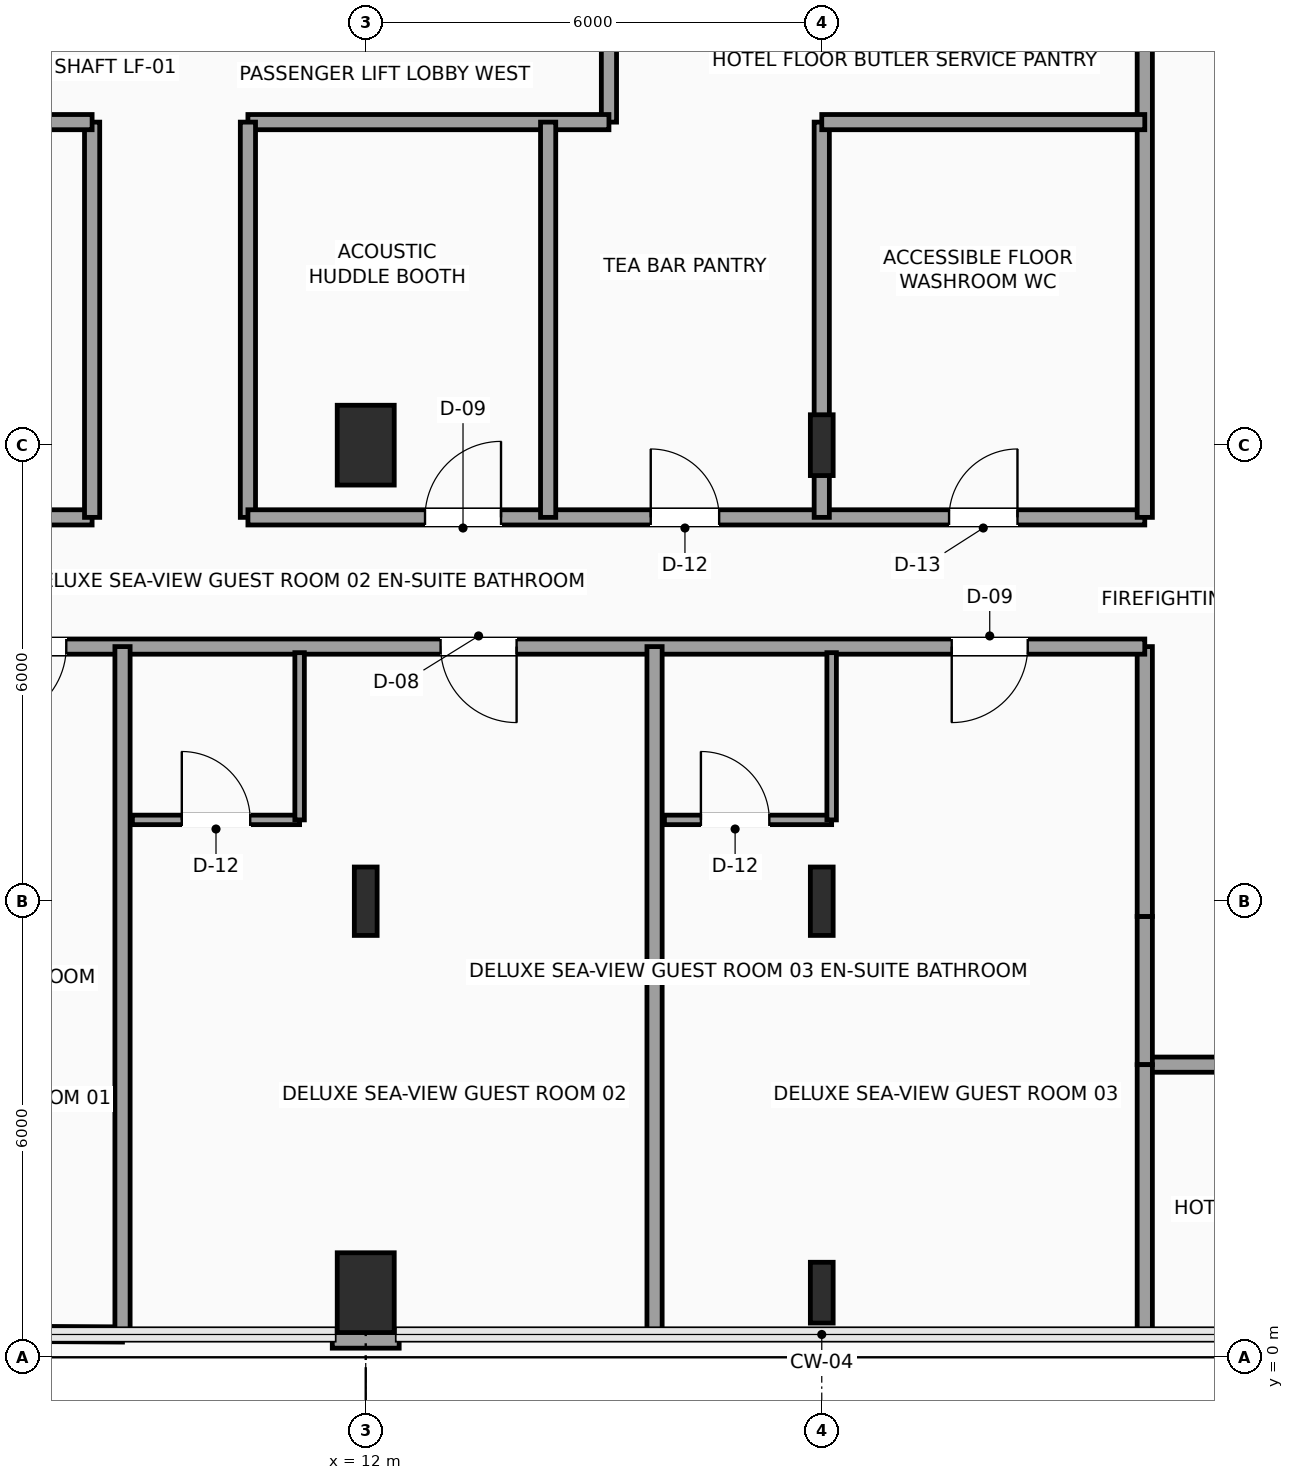
"""IFC4 building model, lengths in metres.
Left out: names, types, materials, properties, quantities, classifications, styles, units other than length and angle.
Written with IfcOpenShell. Run it as: python <this file> out.ifc"""

import sys

from ifc_helpers import new_model, si_unit, direction, frame, frame_2d, origin, origin_2d, place, context, subcontext, project, spatial, rectangle, i_section, extrude, element, fill, save


model = new_model("IFC4")
c1 = context("Model", 3, precision=1e-05, world=origin(), true_north=direction((0.0, 1.0)))
c2 = subcontext(c1, "Body", "Model", "MODEL_VIEW")
j1 = project(units=[si_unit("LENGTHUNIT", "METRE"), si_unit("PLANEANGLEUNIT", "RADIAN")], contexts=[c1])
p1 = place(None, origin())
s1 = spatial("IfcSite", under=j1, at=p1, CompositionType="ELEMENT")
p2 = place(p1, origin())
s2 = spatial("IfcBuilding", under=s1, at=p2, CompositionType="ELEMENT")
p3 = place(p2, frame((0.0, 0.0, 169.2)))
s3 = spatial("IfcBuildingStorey", under=s2, at=p3, CompositionType="ELEMENT", Elevation=169.2)
p4 = place(p3, frame((12.0, 0.85, 0.0), z_axis=(0.0, 0.0, 1.0), x_axis=(1.0, 0.0, 0.0)))
e1 = element("IfcColumn", 1, at=p4, inside=s3, PredefinedType="COLUMN", context=c2, shape_type="SweptSolid", body=[
    extrude(rectangle(XDim=0.75, YDim=1.05, at=origin_2d()), origin(), (0.0, 0.0, 1.0), 3.75),
])
p5 = place(p3, frame((12.0, 6.0, 0.0), z_axis=(0.0, 0.0, 1.0), x_axis=(1.0, 0.0, 0.0)))
e2 = element("IfcColumn", 2, at=p5, inside=s3, PredefinedType="COLUMN", context=c2, shape_type="SweptSolid", body=[
    extrude(i_section(OverallWidth=0.3, OverallDepth=0.9, WebThickness=0.019, FlangeThickness=0.035, FilletRadius=0.03, at=origin_2d()), origin(), (0.0, 0.0, 1.0), 3.75),
])
p6 = place(p3, frame((12.0, 12.0, 0.0), z_axis=(0.0, 0.0, 1.0), x_axis=(1.0, 0.0, 0.0)))
e3 = element("IfcColumn", 3, at=p6, inside=s3, PredefinedType="COLUMN", context=c2, shape_type="SweptSolid", body=[
    extrude(rectangle(XDim=0.75, YDim=1.05, at=origin_2d()), origin(), (0.0, 0.0, 1.0), 3.75),
])
p7 = place(p3, frame((18.0, 0.85, 0.0), z_axis=(0.0, 0.0, 1.0), x_axis=(1.0, 0.0, 0.0)))
e4 = element("IfcColumn", 4, at=p7, inside=s3, PredefinedType="COLUMN", context=c2, shape_type="SweptSolid", body=[
    extrude(i_section(OverallWidth=0.3, OverallDepth=0.8, WebThickness=0.018, FlangeThickness=0.033, FilletRadius=0.03, at=origin_2d()), origin(), (0.0, 0.0, 1.0), 3.75),
])
p8 = place(p3, frame((18.0, 6.0, 0.0), z_axis=(0.0, 0.0, 1.0), x_axis=(1.0, 0.0, 0.0)))
e5 = element("IfcColumn", 5, at=p8, inside=s3, PredefinedType="COLUMN", context=c2, shape_type="SweptSolid", body=[
    extrude(i_section(OverallWidth=0.3, OverallDepth=0.9, WebThickness=0.019, FlangeThickness=0.035, FilletRadius=0.03, at=origin_2d()), origin(), (0.0, 0.0, 1.0), 3.75),
])
p9 = place(p3, frame((18.0, 12.0, 0.0), z_axis=(0.0, 0.0, 1.0), x_axis=(1.0, 0.0, 0.0)))
e6 = element("IfcColumn", 6, at=p9, inside=s3, PredefinedType="COLUMN", context=c2, shape_type="SweptSolid", body=[
    extrude(i_section(OverallWidth=0.3, OverallDepth=0.8, WebThickness=0.018, FlangeThickness=0.033, FilletRadius=0.03, at=origin_2d()), origin(), (0.0, 0.0, 1.0), 3.75),
])
p10 = place(p3, frame((12.44, 0.24, 0.0), z_axis=(0.0, 0.0, 1.0), x_axis=(-1.0, 0.0, 0.0)))
e7 = element("IfcWall", 7, at=p10, inside=s3, PredefinedType="SOLIDWALL", context=c2, shape_type="SweptSolid", body=[
    extrude(rectangle(XDim=0.88, YDim=0.24, at=frame_2d((0.44, 0.0))), origin(), (0.0, 0.0, 1.0), 3.54),
])
p11 = place(p3, frame((23.95, 3.85, 0.0), z_axis=(0.0, 0.0, 1.0), x_axis=(-1.0, 0.0, 0.0)))
e8 = element("IfcWall", 8, at=p11, inside=s3, PredefinedType="PARTITIONING", context=c2, shape_type="SweptSolid", body=[
    extrude(rectangle(XDim=1.7, YDim=0.2, at=frame_2d((0.85, 0.0))), origin(), (0.0, 0.0, 1.0), 3.54),
])
p12 = place(p3, frame((22.25, 3.85, 0.0), z_axis=(0.0, 0.0, 1.0), x_axis=(0.0, 1.0, 0.0)))
e9 = element("IfcWall", 9, at=p12, inside=s3, PredefinedType="PARTITIONING", context=c2, shape_type="SweptSolid", body=[
    extrude(rectangle(XDim=1.95, YDim=0.2, at=frame_2d((0.975, 0.0))), origin(), (0.0, 0.0, 1.0), 3.54),
])
p13 = place(p3, frame((22.25, 5.8, 0.0), z_axis=(0.0, 0.0, 1.0), x_axis=(0.0, 1.0, 0.0)))
e10 = element("IfcWall", 10, at=p13, inside=s3, PredefinedType="PARTITIONING", context=c2, shape_type="SweptSolid", body=[
    extrude(rectangle(XDim=3.55, YDim=0.2, at=frame_2d((1.775, 0.0))), origin(), (0.0, 0.0, 1.0), 3.54),
])
p14 = place(p3, frame((22.25, 9.35, 0.0), z_axis=(0.0, 0.0, 1.0), x_axis=(-1.0, 0.0, 0.0)))
e11 = element("IfcWall", 11, at=p14, inside=s3, PredefinedType="PARTITIONING", context=c2, shape_type="SweptSolid", body=[
    extrude(rectangle(XDim=15.85, YDim=0.2, at=frame_2d((7.925, 0.0))), origin(), (0.0, 0.0, 1.0), 3.54),
])
p15 = place(p14, frame((14.19, 0.0, 0.0)))
e12 = element("IfcOpeningElement", 12, at=p15, cuts=e11, PredefinedType="OPENING", context=c2, shape_type="SweptSolid", body=[
    extrude(rectangle(XDim=1.0, YDim=2.2, at=frame_2d((0.5, 1.1))), frame((0.0, 0.11, 0.0), z_axis=(0.0, -1.0, 0.0), x_axis=(1.0, 0.0, 0.0)), (0.0, 0.0, 1.0), 0.22),
])
p16 = place(p14, frame((8.265, 0.0, 0.0)))
e13 = element("IfcOpeningElement", 13, at=p16, cuts=e11, PredefinedType="OPENING", context=c2, shape_type="SweptSolid", body=[
    extrude(rectangle(XDim=1.0, YDim=2.2, at=frame_2d((0.5, 1.1))), frame((0.0, 0.11, 0.0), z_axis=(0.0, -1.0, 0.0), x_axis=(1.0, 0.0, 0.0)), (0.0, 0.0, 1.0), 0.22),
])
p17 = place(p14, frame((1.54, 0.0, 0.0)))
e14 = element("IfcOpeningElement", 14, at=p17, cuts=e11, PredefinedType="OPENING", context=c2, shape_type="SweptSolid", body=[
    extrude(rectangle(XDim=1.0, YDim=2.2, at=frame_2d((0.5, 1.1))), frame((0.0, 0.11, 0.0), z_axis=(0.0, -1.0, 0.0), x_axis=(1.0, 0.0, 0.0)), (0.0, 0.0, 1.0), 0.22),
])
p18 = place(p3, frame((6.4, 11.05, 0.0), z_axis=(0.0, 0.0, 1.0), x_axis=(1.0, 0.0, 0.0)))
e15 = element("IfcWall", 15, at=p18, inside=s3, PredefinedType="PARTITIONING", context=c2, shape_type="SweptSolid", body=[
    extrude(rectangle(XDim=2.0, YDim=0.2, at=frame_2d((1.0, 0.0))), origin(), (0.0, 0.0, 1.0), 3.54),
])
p19 = place(p3, frame((8.4, 11.05, 0.0), z_axis=(0.0, 0.0, 1.0), x_axis=(0.0, 1.0, 0.0)))
e16 = element("IfcWall", 16, at=p19, inside=s3, PredefinedType="PARTITIONING", context=c2, shape_type="SweptSolid", body=[
    extrude(rectangle(XDim=5.2, YDim=0.2, at=frame_2d((2.6, 0.0))), origin(), (0.0, 0.0, 1.0), 3.54),
])
p20 = place(p3, frame((8.4, 16.25, 0.0), z_axis=(0.0, 0.0, 1.0), x_axis=(-1.0, 0.0, 0.0)))
e17 = element("IfcWall", 17, at=p20, inside=s3, PredefinedType="PARTITIONING", context=c2, shape_type="SweptSolid", body=[
    extrude(rectangle(XDim=8.1, YDim=0.2, at=frame_2d((4.05, 0.0))), origin(), (0.0, 0.0, 1.0), 3.54),
])
p21 = place(p20, frame((3.525, 0.0, 0.0)))
e18 = element("IfcOpeningElement", 18, at=p21, cuts=e17, PredefinedType="OPENING", context=c2, shape_type="SweptSolid", body=[
    extrude(rectangle(XDim=1.0, YDim=2.2, at=frame_2d((0.5, 1.1))), frame((0.0, 0.11, 0.0), z_axis=(0.0, -1.0, 0.0), x_axis=(1.0, 0.0, 0.0)), (0.0, 0.0, 1.0), 0.22),
])
p22 = place(p3, frame((15.2, 17.95, 0.0), z_axis=(0.0, 0.0, 1.0), x_axis=(0.0, -1.0, 0.0)))
e19 = element("IfcWall", 19, at=p22, inside=s3, PredefinedType="PARTITIONING", context=c2, shape_type="SweptSolid", body=[
    extrude(rectangle(XDim=1.7, YDim=0.2, at=frame_2d((0.85, 0.0))), origin(), (0.0, 0.0, 1.0), 3.54),
])
p23 = place(p3, frame((15.2, 16.25, 0.0), z_axis=(0.0, 0.0, 1.0), x_axis=(-1.0, 0.0, 0.0)))
e20 = element("IfcWall", 20, at=p23, inside=s3, PredefinedType="PARTITIONING", context=c2, shape_type="SweptSolid", body=[
    extrude(rectangle(XDim=4.75, YDim=0.2, at=frame_2d((2.375, 0.0))), origin(), (0.0, 0.0, 1.0), 3.54),
])
p24 = place(p3, frame((10.45, 16.25, 0.0), z_axis=(0.0, 0.0, 1.0), x_axis=(0.0, -1.0, 0.0)))
e21 = element("IfcWall", 21, at=p24, inside=s3, PredefinedType="PARTITIONING", context=c2, shape_type="SweptSolid", body=[
    extrude(rectangle(XDim=5.2, YDim=0.2, at=frame_2d((2.6, 0.0))), origin(), (0.0, 0.0, 1.0), 3.54),
])
p25 = place(p3, frame((10.45, 11.05, 0.0), z_axis=(0.0, 0.0, 1.0), x_axis=(1.0, 0.0, 0.0)))
e22 = element("IfcWall", 22, at=p25, inside=s3, PredefinedType="PARTITIONING", context=c2, shape_type="SweptSolid", body=[
    extrude(rectangle(XDim=11.8, YDim=0.2, at=frame_2d((5.9, 0.0))), origin(), (0.0, 0.0, 1.0), 3.54),
])
p26 = place(p25, frame((2.33, 0.0, 0.0)))
e23 = element("IfcOpeningElement", 23, at=p26, cuts=e22, PredefinedType="OPENING", context=c2, shape_type="SweptSolid", body=[
    extrude(rectangle(XDim=1.0, YDim=2.2, at=frame_2d((0.5, 1.1))), frame((0.0, 0.11, 0.0), z_axis=(0.0, -1.0, 0.0), x_axis=(1.0, 0.0, 0.0)), (0.0, 0.0, 1.0), 0.22),
])
p27 = place(p25, frame((5.3, 0.0, 0.0)))
e24 = element("IfcOpeningElement", 24, at=p27, cuts=e22, PredefinedType="OPENING", context=c2, shape_type="SweptSolid", body=[
    extrude(rectangle(XDim=0.9, YDim=2.1, at=frame_2d((0.45, 1.05))), frame((0.0, 0.11, 0.0), z_axis=(0.0, -1.0, 0.0), x_axis=(1.0, 0.0, 0.0)), (0.0, 0.0, 1.0), 0.22),
])
p28 = place(p25, frame((9.225, 0.0, 0.0)))
e25 = element("IfcOpeningElement", 25, at=p28, cuts=e22, PredefinedType="OPENING", context=c2, shape_type="SweptSolid", body=[
    extrude(rectangle(XDim=0.9, YDim=2.1, at=frame_2d((0.45, 1.05))), frame((0.0, 0.11, 0.0), z_axis=(0.0, -1.0, 0.0), x_axis=(1.0, 0.0, 0.0)), (0.0, 0.0, 1.0), 0.22),
])
p29 = place(p3, frame((22.25, 11.05, 0.0), z_axis=(0.0, 0.0, 1.0), x_axis=(0.0, 1.0, 0.0)))
e26 = element("IfcWall", 26, at=p29, inside=s3, PredefinedType="PARTITIONING", context=c2, shape_type="SweptSolid", body=[
    extrude(rectangle(XDim=19.2, YDim=0.2, at=frame_2d((9.6, 0.0))), origin(), (0.0, 0.0, 1.0), 3.54),
])
p30 = place(p3, frame((14.4, 11.05, 0.0), z_axis=(0.0, 0.0, 1.0), x_axis=(0.0, 1.0, 0.0)))
e27 = element("IfcWall", 27, at=p30, inside=s3, PredefinedType="PARTITIONING", context=c2, shape_type="SweptSolid", body=[
    extrude(rectangle(XDim=5.2, YDim=0.2, at=frame_2d((2.6, 0.0))), origin(), (0.0, 0.0, 1.0), 3.54),
])
p31 = place(p3, frame((18.0, 11.05, 0.0), z_axis=(0.0, 0.0, 1.0), x_axis=(0.0, 1.0, 0.0)))
e28 = element("IfcWall", 28, at=p31, inside=s3, PredefinedType="PARTITIONING", context=c2, shape_type="SweptSolid", body=[
    extrude(rectangle(XDim=5.2, YDim=0.2, at=frame_2d((2.6, 0.0))), origin(), (0.0, 0.0, 1.0), 3.132),
])
p32 = place(p3, frame((18.0, 16.25, 0.0), z_axis=(0.0, 0.0, 1.0), x_axis=(1.0, 0.0, 0.0)))
e29 = element("IfcWall", 29, at=p32, inside=s3, PredefinedType="PARTITIONING", context=c2, shape_type="SweptSolid", body=[
    extrude(rectangle(XDim=4.25, YDim=0.2, at=frame_2d((2.125, 0.0))), origin(), (0.0, 0.0, 1.0), 3.54),
])
p33 = place(p3, frame((22.25, 0.3, 0.0), z_axis=(0.0, 0.0, 1.0), x_axis=(0.0, 1.0, 0.0)))
e30 = element("IfcWall", 30, at=p33, inside=s3, PredefinedType="PARTITIONING", context=c2, shape_type="SweptSolid", body=[
    extrude(rectangle(XDim=3.55, YDim=0.2, at=frame_2d((1.775, 0.0))), origin(), (0.0, 0.0, 1.0), 3.54),
])
p34 = place(p3, frame((0.35, 0.35, 0.0), z_axis=(0.0, 0.0, 1.0), x_axis=(0.99998245966, -0.005922868574, 0.0)))
e31 = element("IfcWall", 31, at=p34, inside=s3, PredefinedType="PARTITIONING", context=c2, shape_type="SweptSolid", body=[
    extrude(rectangle(XDim=8.45, YDim=0.2, at=frame_2d((4.225, 0.0))), origin(), (0.0, 0.0, 1.0), 3.54),
])
for number, where, z_axis, x_axis in (
    (32, (8.8, 0.3, 0.0), (0.0, 0.0, 1.0), (0.0, 1.0, 0.0)),
    (33, (15.8, 0.3, 0.0), (0.0, 0.0, 1.0), (0.0, 1.0, 0.0)),
):
    element("IfcWall", number, at=place(p3, frame(where, z_axis=z_axis, x_axis=x_axis)), inside=s3, PredefinedType="PARTITIONING", context=c2, shape_type="SweptSolid", body=[
        extrude(rectangle(XDim=9.05, YDim=0.2, at=frame_2d((4.525, 0.0))), origin(), (0.0, 0.0, 1.0), 3.54),
    ])
p35 = place(p3, frame((8.93, 7.07, 0.0), z_axis=(0.0, 0.0, 1.0), x_axis=(1.0, 0.0, 0.0)))
e34 = element("IfcWall", 34, at=p35, inside=s3, PredefinedType="PARTITIONING", context=c2, shape_type="SweptSolid", body=[
    extrude(rectangle(XDim=2.2, YDim=0.125, at=frame_2d((1.1, 0.0))), origin(), (0.0, 0.0, 1.0), 3.54),
])
p36 = place(p35, frame((0.65, 0.0, 0.0)))
e35 = element("IfcOpeningElement", 35, at=p36, cuts=e34, PredefinedType="OPENING", context=c2, shape_type="SweptSolid", body=[
    extrude(rectangle(XDim=0.9, YDim=2.1, at=frame_2d((0.45, 1.05))), frame((0.0, 0.073, 0.0), z_axis=(0.0, -1.0, 0.0), x_axis=(1.0, 0.0, 0.0)), (0.0, 0.0, 1.0), 0.145),
])
p37 = place(p3, frame((11.13, 7.07, 0.0), z_axis=(0.0, 0.0, 1.0), x_axis=(0.0, 1.0, 0.0)))
e36 = element("IfcWall", 36, at=p37, inside=s3, PredefinedType="PARTITIONING", context=c2, shape_type="SweptSolid", body=[
    extrude(rectangle(XDim=2.2, YDim=0.125, at=frame_2d((1.1, 0.0))), origin(), (0.0, 0.0, 1.0), 3.54),
])
p38 = place(p3, frame((15.93, 7.07, 0.0), z_axis=(0.0, 0.0, 1.0), x_axis=(1.0, 0.0, 0.0)))
e37 = element("IfcWall", 37, at=p38, inside=s3, PredefinedType="PARTITIONING", context=c2, shape_type="SweptSolid", body=[
    extrude(rectangle(XDim=2.2, YDim=0.125, at=frame_2d((1.1, 0.0))), origin(), (0.0, 0.0, 1.0), 3.54),
])
p39 = place(p38, frame((0.48, 0.0, 0.0)))
e38 = element("IfcOpeningElement", 38, at=p39, cuts=e37, PredefinedType="OPENING", context=c2, shape_type="SweptSolid", body=[
    extrude(rectangle(XDim=0.9, YDim=2.1, at=frame_2d((0.45, 1.05))), frame((0.0, 0.073, 0.0), z_axis=(0.0, -1.0, 0.0), x_axis=(1.0, 0.0, 0.0)), (0.0, 0.0, 1.0), 0.145),
])
p40 = place(p3, frame((18.13, 7.07, 0.0), z_axis=(0.0, 0.0, 1.0), x_axis=(0.0, 1.0, 0.0)))
e39 = element("IfcWall", 39, at=p40, inside=s3, PredefinedType="PARTITIONING", context=c2, shape_type="SweptSolid", body=[
    extrude(rectangle(XDim=2.2, YDim=0.125, at=frame_2d((1.1, 0.0))), origin(), (0.0, 0.0, 1.0), 3.132),
])
p41 = place(p15, origin())
e40 = element("IfcDoor", 40, at=p41, inside=s3, OperationType="SINGLE_SWING_RIGHT", PredefinedType="DOOR", context=c2, shape_type="SweptSolid", body=[
    extrude(rectangle(XDim=1.0, YDim=2.2, at=frame_2d((0.5, 1.1))), frame((0.0, 0.025, 0.0), z_axis=(0.0, -1.0, 0.0), x_axis=(1.0, 0.0, 0.0)), (0.0, 0.0, 1.0), 0.05),
])
fill(e12, e40)
p42 = place(p16, origin())
e41 = element("IfcDoor", 41, at=p42, inside=s3, OperationType="SINGLE_SWING_LEFT", PredefinedType="DOOR", context=c2, shape_type="SweptSolid", body=[
    extrude(rectangle(XDim=1.0, YDim=2.2, at=frame_2d((0.5, 1.1))), frame((0.0, 0.025, 0.0), z_axis=(0.0, -1.0, 0.0), x_axis=(1.0, 0.0, 0.0)), (0.0, 0.0, 1.0), 0.05),
])
fill(e13, e41)
p43 = place(p17, origin())
e42 = element("IfcDoor", 42, at=p43, inside=s3, OperationType="SINGLE_SWING_RIGHT", PredefinedType="DOOR", context=c2, shape_type="SweptSolid", body=[
    extrude(rectangle(XDim=1.0, YDim=2.2, at=frame_2d((0.5, 1.1))), frame((0.0, 0.025, 0.0), z_axis=(0.0, -1.0, 0.0), x_axis=(1.0, 0.0, 0.0)), (0.0, 0.0, 1.0), 0.05),
])
fill(e14, e42)
p44 = place(p26, origin())
e43 = element("IfcDoor", 43, at=p44, inside=s3, OperationType="SINGLE_SWING_RIGHT", PredefinedType="DOOR", context=c2, shape_type="SweptSolid", body=[
    extrude(rectangle(XDim=1.0, YDim=2.2, at=frame_2d((0.5, 1.1))), frame((0.0, 0.025, 0.0), z_axis=(0.0, -1.0, 0.0), x_axis=(1.0, 0.0, 0.0)), (0.0, 0.0, 1.0), 0.05),
])
fill(e23, e43)
p45 = place(p27, origin())
e44 = element("IfcDoor", 44, at=p45, inside=s3, OperationType="SINGLE_SWING_LEFT", PredefinedType="DOOR", context=c2, shape_type="SweptSolid", body=[
    extrude(rectangle(XDim=0.9, YDim=2.1, at=frame_2d((0.45, 1.05))), frame((0.0, 0.025, 0.0), z_axis=(0.0, -1.0, 0.0), x_axis=(1.0, 0.0, 0.0)), (0.0, 0.0, 1.0), 0.05),
])
fill(e24, e44)
p46 = place(p28, origin())
e45 = element("IfcDoor", 45, at=p46, inside=s3, OperationType="SINGLE_SWING_RIGHT", PredefinedType="DOOR", context=c2, shape_type="SweptSolid", body=[
    extrude(rectangle(XDim=0.9, YDim=2.1, at=frame_2d((0.45, 1.05))), frame((0.0, 0.025, 0.0), z_axis=(0.0, -1.0, 0.0), x_axis=(1.0, 0.0, 0.0)), (0.0, 0.0, 1.0), 0.05),
])
fill(e25, e45)
p47 = place(p36, origin())
e46 = element("IfcDoor", 46, at=p47, inside=s3, OperationType="SINGLE_SWING_LEFT", PredefinedType="DOOR", context=c2, shape_type="SweptSolid", body=[
    extrude(rectangle(XDim=0.9, YDim=2.1, at=frame_2d((0.45, 1.05))), frame((0.0, 0.025, 0.0), z_axis=(0.0, -1.0, 0.0), x_axis=(1.0, 0.0, 0.0)), (0.0, 0.0, 1.0), 0.05),
])
fill(e35, e46)
p48 = place(p39, origin())
e47 = element("IfcDoor", 47, at=p48, inside=s3, OperationType="SINGLE_SWING_LEFT", PredefinedType="DOOR", context=c2, shape_type="SweptSolid", body=[
    extrude(rectangle(XDim=0.9, YDim=2.1, at=frame_2d((0.45, 1.05))), frame((0.0, 0.025, 0.0), z_axis=(0.0, -1.0, 0.0), x_axis=(1.0, 0.0, 0.0)), (0.0, 0.0, 1.0), 0.05),
])
fill(e38, e47)
save(model, sys.argv[1])
